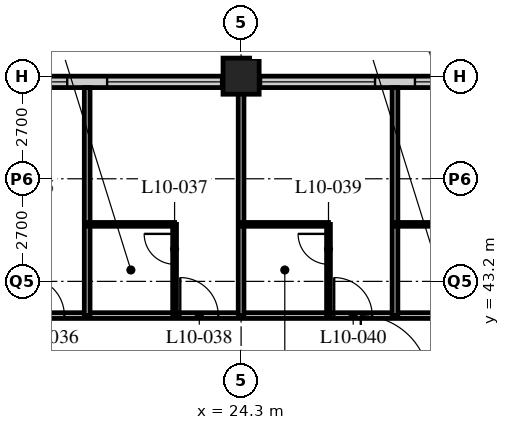
"""IFC4 building model, lengths in metres.
Left out: names, types, materials, properties, quantities, classifications, styles, units other than length and angle.
Written with IfcOpenShell. Run it as: python <this file> out.ifc"""

import sys

from ifc_helpers import new_model, si_unit, direction, frame, frame_2d, origin, origin_2d, place, context, subcontext, project, spatial, rectangle, hollow_rectangle, extrude, element, fill, save


model = new_model("IFC4")
c1 = context("Model", 3, precision=1e-05, world=origin(), true_north=direction((0.0, 1.0)))
c2 = subcontext(c1, "Body", "Model", "MODEL_VIEW")
j1 = project(units=[si_unit("LENGTHUNIT", "METRE"), si_unit("PLANEANGLEUNIT", "RADIAN")], contexts=[c1])
p1 = place(None, origin())
s1 = spatial("IfcSite", under=j1, at=p1, CompositionType="ELEMENT")
p2 = place(p1, origin())
s2 = spatial("IfcBuilding", under=s1, at=p2, CompositionType="ELEMENT")
p3 = place(p2, frame((0.0, 0.0, 46.6)))
s3 = spatial("IfcBuildingStorey", under=s2, at=p3, CompositionType="ELEMENT", Elevation=46.6)
p4 = place(p3, frame((24.3, 48.6, 0.0), z_axis=(0.0, 0.0, 1.0), x_axis=(1.0, 0.0, 0.0)))
e1 = element("IfcColumn", 1, at=p4, inside=s3, PredefinedType="COLUMN", context=c2, shape_type="SweptSolid", body=[
    extrude(hollow_rectangle(XDim=0.95, YDim=0.95, WallThickness=0.095, at=origin_2d()), origin(), (0.0, 0.0, 1.0), 3.4),
])
p5 = place(p3, frame((48.3, 48.45, 0.0), z_axis=(0.0, 0.0, 1.0), x_axis=(-1.0, 0.0, 0.0)))
e2 = element("IfcWall", 2, at=p5, inside=s3, PredefinedType="SOLIDWALL", context=c2, shape_type="SweptSolid", body=[
    extrude(rectangle(XDim=40.2, YDim=0.3, at=frame_2d((20.1, 0.0))), origin(), (0.0, 0.0, 1.0), 3.19),
])
p6 = place(p5, frame((0.225, 0.0, 0.9)))
e3 = element("IfcOpeningElement", 3, at=p6, cuts=e2, PredefinedType="OPENING", context=c2, shape_type="SweptSolid", body=[
    extrude(rectangle(XDim=3.0, YDim=2.0, at=frame_2d((1.5, 1.0))), frame((0.0, 0.16, 0.0), z_axis=(0.0, -1.0, 0.0), x_axis=(1.0, 0.0, 0.0)), (0.0, 0.0, 1.0), 0.32),
])
p7 = place(p5, frame((4.275, 0.0, 0.9)))
e4 = element("IfcOpeningElement", 4, at=p7, cuts=e2, PredefinedType="OPENING", context=c2, shape_type="SweptSolid", body=[
    extrude(rectangle(XDim=3.0, YDim=2.0, at=frame_2d((1.5, 1.0))), frame((0.0, 0.16, 0.0), z_axis=(0.0, -1.0, 0.0), x_axis=(1.0, 0.0, 0.0)), (0.0, 0.0, 1.0), 0.32),
])
p8 = place(p5, frame((8.325, 0.0, 0.9)))
e5 = element("IfcOpeningElement", 5, at=p8, cuts=e2, PredefinedType="OPENING", context=c2, shape_type="SweptSolid", body=[
    extrude(rectangle(XDim=3.0, YDim=2.0, at=frame_2d((1.5, 1.0))), frame((0.0, 0.16, 0.0), z_axis=(0.0, -1.0, 0.0), x_axis=(1.0, 0.0, 0.0)), (0.0, 0.0, 1.0), 0.32),
])
p9 = place(p5, frame((12.375, 0.0, 0.9)))
e6 = element("IfcOpeningElement", 6, at=p9, cuts=e2, PredefinedType="OPENING", context=c2, shape_type="SweptSolid", body=[
    extrude(rectangle(XDim=3.0, YDim=2.0, at=frame_2d((1.5, 1.0))), frame((0.0, 0.16, 0.0), z_axis=(0.0, -1.0, 0.0), x_axis=(1.0, 0.0, 0.0)), (0.0, 0.0, 1.0), 0.32),
])
p10 = place(p5, frame((16.425, 0.0, 0.9)))
e7 = element("IfcOpeningElement", 7, at=p10, cuts=e2, PredefinedType="OPENING", context=c2, shape_type="SweptSolid", body=[
    extrude(rectangle(XDim=3.0, YDim=2.0, at=frame_2d((1.5, 1.0))), frame((0.0, 0.16, 0.0), z_axis=(0.0, -1.0, 0.0), x_axis=(1.0, 0.0, 0.0)), (0.0, 0.0, 1.0), 0.32),
])
p11 = place(p5, frame((20.475, 0.0, 0.9)))
e8 = element("IfcOpeningElement", 8, at=p11, cuts=e2, PredefinedType="OPENING", context=c2, shape_type="SweptSolid", body=[
    extrude(rectangle(XDim=3.0, YDim=2.0, at=frame_2d((1.5, 1.0))), frame((0.0, 0.16, 0.0), z_axis=(0.0, -1.0, 0.0), x_axis=(1.0, 0.0, 0.0)), (0.0, 0.0, 1.0), 0.32),
])
p12 = place(p5, frame((24.525, 0.0, 0.9)))
e9 = element("IfcOpeningElement", 9, at=p12, cuts=e2, PredefinedType="OPENING", context=c2, shape_type="SweptSolid", body=[
    extrude(rectangle(XDim=3.0, YDim=2.0, at=frame_2d((1.5, 1.0))), frame((0.0, 0.16, 0.0), z_axis=(0.0, -1.0, 0.0), x_axis=(1.0, 0.0, 0.0)), (0.0, 0.0, 1.0), 0.32),
])
p13 = place(p5, frame((28.575, 0.0, 0.9)))
e10 = element("IfcOpeningElement", 10, at=p13, cuts=e2, PredefinedType="OPENING", context=c2, shape_type="SweptSolid", body=[
    extrude(rectangle(XDim=3.0, YDim=2.0, at=frame_2d((1.5, 1.0))), frame((0.0, 0.16, 0.0), z_axis=(0.0, -1.0, 0.0), x_axis=(1.0, 0.0, 0.0)), (0.0, 0.0, 1.0), 0.32),
])
p14 = place(p5, frame((32.625, 0.0, 0.9)))
e11 = element("IfcOpeningElement", 11, at=p14, cuts=e2, PredefinedType="OPENING", context=c2, shape_type="SweptSolid", body=[
    extrude(rectangle(XDim=3.0, YDim=2.0, at=frame_2d((1.5, 1.0))), frame((0.0, 0.16, 0.0), z_axis=(0.0, -1.0, 0.0), x_axis=(1.0, 0.0, 0.0)), (0.0, 0.0, 1.0), 0.32),
])
p15 = place(p5, frame((36.675, 0.0, 0.9)))
e12 = element("IfcOpeningElement", 12, at=p15, cuts=e2, PredefinedType="OPENING", context=c2, shape_type="SweptSolid", body=[
    extrude(rectangle(XDim=3.0, YDim=2.0, at=frame_2d((1.5, 1.0))), frame((0.0, 0.16, 0.0), z_axis=(0.0, -1.0, 0.0), x_axis=(1.0, 0.0, 0.0)), (0.0, 0.0, 1.0), 0.32),
])
p16 = place(p3, frame((8.1, 42.3, 0.0), z_axis=(0.0, 0.0, 1.0), x_axis=(1.0, 0.0, 0.0)))
e13 = element("IfcWall", 13, at=p16, inside=s3, PredefinedType="PARTITIONING", context=c2, shape_type="SweptSolid", body=[
    extrude(rectangle(XDim=40.5, YDim=0.15, at=frame_2d((20.25, 0.0))), origin(), (0.0, 0.0, 1.0), 3.19),
])
p17 = place(p16, frame((6.5, 0.0, 0.0)))
e14 = element("IfcOpeningElement", 14, at=p17, cuts=e13, PredefinedType="OPENING", context=c2, shape_type="SweptSolid", body=[
    extrude(rectangle(XDim=1.0, YDim=2.1, at=frame_2d((0.5, 1.05))), frame((0.0, 0.085, 0.0), z_axis=(0.0, -1.0, 0.0), x_axis=(1.0, 0.0, 0.0)), (0.0, 0.0, 1.0), 0.17),
])
p18 = place(p16, frame((10.55, 0.0, 0.0)))
e15 = element("IfcOpeningElement", 15, at=p18, cuts=e13, PredefinedType="OPENING", context=c2, shape_type="SweptSolid", body=[
    extrude(rectangle(XDim=1.0, YDim=2.1, at=frame_2d((0.5, 1.05))), frame((0.0, 0.085, 0.0), z_axis=(0.0, -1.0, 0.0), x_axis=(1.0, 0.0, 0.0)), (0.0, 0.0, 1.0), 0.17),
])
p19 = place(p16, frame((14.6, 0.0, 0.0)))
e16 = element("IfcOpeningElement", 16, at=p19, cuts=e13, PredefinedType="OPENING", context=c2, shape_type="SweptSolid", body=[
    extrude(rectangle(XDim=1.0, YDim=2.1, at=frame_2d((0.5, 1.05))), frame((0.0, 0.085, 0.0), z_axis=(0.0, -1.0, 0.0), x_axis=(1.0, 0.0, 0.0)), (0.0, 0.0, 1.0), 0.17),
])
p20 = place(p16, frame((18.65, 0.0, 0.0)))
e17 = element("IfcOpeningElement", 17, at=p20, cuts=e13, PredefinedType="OPENING", context=c2, shape_type="SweptSolid", body=[
    extrude(rectangle(XDim=1.0, YDim=2.1, at=frame_2d((0.5, 1.05))), frame((0.0, 0.085, 0.0), z_axis=(0.0, -1.0, 0.0), x_axis=(1.0, 0.0, 0.0)), (0.0, 0.0, 1.0), 0.17),
])
p21 = place(p16, frame((22.7, 0.0, 0.0)))
e18 = element("IfcOpeningElement", 18, at=p21, cuts=e13, PredefinedType="OPENING", context=c2, shape_type="SweptSolid", body=[
    extrude(rectangle(XDim=1.0, YDim=2.1, at=frame_2d((0.5, 1.05))), frame((0.0, 0.085, 0.0), z_axis=(0.0, -1.0, 0.0), x_axis=(1.0, 0.0, 0.0)), (0.0, 0.0, 1.0), 0.17),
])
p22 = place(p16, frame((26.75, 0.0, 0.0)))
e19 = element("IfcOpeningElement", 19, at=p22, cuts=e13, PredefinedType="OPENING", context=c2, shape_type="SweptSolid", body=[
    extrude(rectangle(XDim=1.0, YDim=2.1, at=frame_2d((0.5, 1.05))), frame((0.0, 0.085, 0.0), z_axis=(0.0, -1.0, 0.0), x_axis=(1.0, 0.0, 0.0)), (0.0, 0.0, 1.0), 0.17),
])
p23 = place(p16, frame((30.8, 0.0, 0.0)))
e20 = element("IfcOpeningElement", 20, at=p23, cuts=e13, PredefinedType="OPENING", context=c2, shape_type="SweptSolid", body=[
    extrude(rectangle(XDim=1.0, YDim=2.1, at=frame_2d((0.5, 1.05))), frame((0.0, 0.085, 0.0), z_axis=(0.0, -1.0, 0.0), x_axis=(1.0, 0.0, 0.0)), (0.0, 0.0, 1.0), 0.17),
])
p24 = place(p16, frame((34.85, 0.0, 0.0)))
e21 = element("IfcOpeningElement", 21, at=p24, cuts=e13, PredefinedType="OPENING", context=c2, shape_type="SweptSolid", body=[
    extrude(rectangle(XDim=1.0, YDim=2.1, at=frame_2d((0.5, 1.05))), frame((0.0, 0.085, 0.0), z_axis=(0.0, -1.0, 0.0), x_axis=(1.0, 0.0, 0.0)), (0.0, 0.0, 1.0), 0.17),
])
p25 = place(p16, frame((36.875, 0.0, 0.0)))
e22 = element("IfcOpeningElement", 22, at=p25, cuts=e13, PredefinedType="OPENING", context=c2, shape_type="SweptSolid", body=[
    extrude(rectangle(XDim=1.0, YDim=2.1, at=frame_2d((0.5, 1.05))), frame((0.0, 0.085, 0.0), z_axis=(0.0, -1.0, 0.0), x_axis=(1.0, 0.0, 0.0)), (0.0, 0.0, 1.0), 0.17),
])
p26 = place(p16, frame((2.625, 0.0, 0.0)))
e23 = element("IfcOpeningElement", 23, at=p26, cuts=e13, PredefinedType="OPENING", context=c2, shape_type="SweptSolid", body=[
    extrude(rectangle(XDim=1.0, YDim=2.1, at=frame_2d((0.5, 1.05))), frame((0.0, 0.085, 0.0), z_axis=(0.0, -1.0, 0.0), x_axis=(1.0, 0.0, 0.0)), (0.0, 0.0, 1.0), 0.17),
])
p27 = place(p3, frame((20.25, 42.3, 0.0), z_axis=(0.0, 0.0, 1.0), x_axis=(0.0, 1.0, 0.0)))
e24 = element("IfcWall", 24, at=p27, inside=s3, PredefinedType="PARTITIONING", context=c2, shape_type="SweptSolid", body=[
    extrude(rectangle(XDim=6.0, YDim=0.15, at=frame_2d((3.0, 0.0))), origin(), (0.0, 0.0, 1.0), 3.19),
])
p28 = place(p3, frame((20.25, 44.7, 0.0), z_axis=(0.0, 0.0, 1.0), x_axis=(1.0, 0.0, 0.0)))
e25 = element("IfcWall", 25, at=p28, inside=s3, PredefinedType="PARTITIONING", context=c2, shape_type="SweptSolid", body=[
    extrude(rectangle(XDim=2.3, YDim=0.1, at=frame_2d((1.15, 0.0))), origin(), (0.0, 0.0, 1.0), 3.19),
])
p29 = place(p3, frame((22.55, 42.3, 0.0), z_axis=(0.0, 0.0, 1.0), x_axis=(0.0, 1.0, 0.0)))
e26 = element("IfcWall", 26, at=p29, inside=s3, PredefinedType="PARTITIONING", context=c2, shape_type="SweptSolid", body=[
    extrude(rectangle(XDim=2.4, YDim=0.1, at=frame_2d((1.2, 0.0))), origin(), (0.0, 0.0, 1.0), 3.19),
])
p30 = place(p29, frame((1.35, 0.0, 0.0)))
e27 = element("IfcOpeningElement", 27, at=p30, cuts=e26, PredefinedType="OPENING", context=c2, shape_type="SweptSolid", body=[
    extrude(rectangle(XDim=0.8, YDim=2.1, at=frame_2d((0.4, 1.05))), frame((0.0, 0.06, 0.0), z_axis=(0.0, -1.0, 0.0), x_axis=(1.0, 0.0, 0.0)), (0.0, 0.0, 1.0), 0.12),
])
p31 = place(p3, frame((24.3, 42.3, 0.0), z_axis=(0.0, 0.0, 1.0), x_axis=(0.0, 1.0, 0.0)))
e28 = element("IfcWall", 28, at=p31, inside=s3, PredefinedType="PARTITIONING", context=c2, shape_type="SweptSolid", body=[
    extrude(rectangle(XDim=6.0, YDim=0.15, at=frame_2d((3.0, 0.0))), origin(), (0.0, 0.0, 1.0), 2.578),
])
p32 = place(p3, frame((24.3, 44.7, 0.0), z_axis=(0.0, 0.0, 1.0), x_axis=(1.0, 0.0, 0.0)))
e29 = element("IfcWall", 29, at=p32, inside=s3, PredefinedType="PARTITIONING", context=c2, shape_type="SweptSolid", body=[
    extrude(rectangle(XDim=2.3, YDim=0.1, at=frame_2d((1.15, 0.0))), origin(), (0.0, 0.0, 1.0), 3.19),
])
p33 = place(p3, frame((26.6, 42.3, 0.0), z_axis=(0.0, 0.0, 1.0), x_axis=(0.0, 1.0, 0.0)))
e30 = element("IfcWall", 30, at=p33, inside=s3, PredefinedType="PARTITIONING", context=c2, shape_type="SweptSolid", body=[
    extrude(rectangle(XDim=2.4, YDim=0.1, at=frame_2d((1.2, 0.0))), origin(), (0.0, 0.0, 1.0), 3.19),
])
p34 = place(p33, frame((1.35, 0.0, 0.0)))
e31 = element("IfcOpeningElement", 31, at=p34, cuts=e30, PredefinedType="OPENING", context=c2, shape_type="SweptSolid", body=[
    extrude(rectangle(XDim=0.8, YDim=2.1, at=frame_2d((0.4, 1.05))), frame((0.0, 0.06, 0.0), z_axis=(0.0, -1.0, 0.0), x_axis=(1.0, 0.0, 0.0)), (0.0, 0.0, 1.0), 0.12),
])
p35 = place(p3, frame((28.35, 42.3, 0.0), z_axis=(0.0, 0.0, 1.0), x_axis=(0.0, 1.0, 0.0)))
e32 = element("IfcWall", 32, at=p35, inside=s3, PredefinedType="PARTITIONING", context=c2, shape_type="SweptSolid", body=[
    extrude(rectangle(XDim=6.0, YDim=0.15, at=frame_2d((3.0, 0.0))), origin(), (0.0, 0.0, 1.0), 3.19),
])
p36 = place(p3, frame((28.35, 44.7, 0.0), z_axis=(0.0, 0.0, 1.0), x_axis=(1.0, 0.0, 0.0)))
e33 = element("IfcWall", 33, at=p36, inside=s3, PredefinedType="PARTITIONING", context=c2, shape_type="SweptSolid", body=[
    extrude(rectangle(XDim=2.3, YDim=0.1, at=frame_2d((1.15, 0.0))), origin(), (0.0, 0.0, 1.0), 3.19),
])
p37 = place(p10, origin())
e34 = element("IfcWindow", 34, at=p37, inside=s3, PartitioningType="SINGLE_PANEL", PredefinedType="WINDOW", context=c2, shape_type="SweptSolid", body=[
    extrude(rectangle(XDim=3.0, YDim=2.0, at=frame_2d((1.5, 1.0))), frame((0.0, 0.03, 0.0), z_axis=(0.0, -1.0, 0.0), x_axis=(1.0, 0.0, 0.0)), (0.0, 0.0, 1.0), 0.06),
])
fill(e7, e34)
p38 = place(p11, origin())
e35 = element("IfcWindow", 35, at=p38, inside=s3, PartitioningType="SINGLE_PANEL", PredefinedType="WINDOW", context=c2, shape_type="SweptSolid", body=[
    extrude(rectangle(XDim=3.0, YDim=2.0, at=frame_2d((1.5, 1.0))), frame((0.0, 0.03, 0.0), z_axis=(0.0, -1.0, 0.0), x_axis=(1.0, 0.0, 0.0)), (0.0, 0.0, 1.0), 0.06),
])
fill(e8, e35)
p39 = place(p12, origin())
e36 = element("IfcWindow", 36, at=p39, inside=s3, PartitioningType="SINGLE_PANEL", PredefinedType="WINDOW", context=c2, shape_type="SweptSolid", body=[
    extrude(rectangle(XDim=3.0, YDim=2.0, at=frame_2d((1.5, 1.0))), frame((0.0, 0.03, 0.0), z_axis=(0.0, -1.0, 0.0), x_axis=(1.0, 0.0, 0.0)), (0.0, 0.0, 1.0), 0.06),
])
fill(e9, e36)
p40 = place(p13, origin())
e37 = element("IfcWindow", 37, at=p40, inside=s3, PartitioningType="SINGLE_PANEL", PredefinedType="WINDOW", context=c2, shape_type="SweptSolid", body=[
    extrude(rectangle(XDim=3.0, YDim=2.0, at=frame_2d((1.5, 1.0))), frame((0.0, 0.03, 0.0), z_axis=(0.0, -1.0, 0.0), x_axis=(1.0, 0.0, 0.0)), (0.0, 0.0, 1.0), 0.06),
])
fill(e10, e37)
p41 = place(p18, origin())
e38 = element("IfcDoor", 38, at=p41, inside=s3, OperationType="SINGLE_SWING_LEFT", PredefinedType="DOOR", context=c2, shape_type="SweptSolid", body=[
    extrude(rectangle(XDim=1.0, YDim=2.1, at=frame_2d((0.5, 1.05))), frame((0.0, 0.025, 0.0), z_axis=(0.0, -1.0, 0.0), x_axis=(1.0, 0.0, 0.0)), (0.0, 0.0, 1.0), 0.05),
])
fill(e15, e38)
p42 = place(p30, origin())
e39 = element("IfcDoor", 39, at=p42, inside=s3, OperationType="SINGLE_SWING_RIGHT", PredefinedType="DOOR", context=c2, shape_type="SweptSolid", body=[
    extrude(rectangle(XDim=0.8, YDim=2.1, at=frame_2d((0.4, 1.05))), frame((0.0, 0.025, 0.0), z_axis=(0.0, -1.0, 0.0), x_axis=(1.0, 0.0, 0.0)), (0.0, 0.0, 1.0), 0.05),
])
fill(e27, e39)
p43 = place(p19, origin())
e40 = element("IfcDoor", 40, at=p43, inside=s3, OperationType="SINGLE_SWING_LEFT", PredefinedType="DOOR", context=c2, shape_type="SweptSolid", body=[
    extrude(rectangle(XDim=1.0, YDim=2.1, at=frame_2d((0.5, 1.05))), frame((0.0, 0.025, 0.0), z_axis=(0.0, -1.0, 0.0), x_axis=(1.0, 0.0, 0.0)), (0.0, 0.0, 1.0), 0.05),
])
fill(e16, e40)
p44 = place(p34, origin())
e41 = element("IfcDoor", 41, at=p44, inside=s3, OperationType="SINGLE_SWING_RIGHT", PredefinedType="DOOR", context=c2, shape_type="SweptSolid", body=[
    extrude(rectangle(XDim=0.8, YDim=2.1, at=frame_2d((0.4, 1.05))), frame((0.0, 0.025, 0.0), z_axis=(0.0, -1.0, 0.0), x_axis=(1.0, 0.0, 0.0)), (0.0, 0.0, 1.0), 0.05),
])
fill(e31, e41)
p45 = place(p20, origin())
e42 = element("IfcDoor", 42, at=p45, inside=s3, OperationType="SINGLE_SWING_LEFT", PredefinedType="DOOR", context=c2, shape_type="SweptSolid", body=[
    extrude(rectangle(XDim=1.0, YDim=2.1, at=frame_2d((0.5, 1.05))), frame((0.0, 0.025, 0.0), z_axis=(0.0, -1.0, 0.0), x_axis=(1.0, 0.0, 0.0)), (0.0, 0.0, 1.0), 0.05),
])
fill(e17, e42)
save(model, sys.argv[1])
